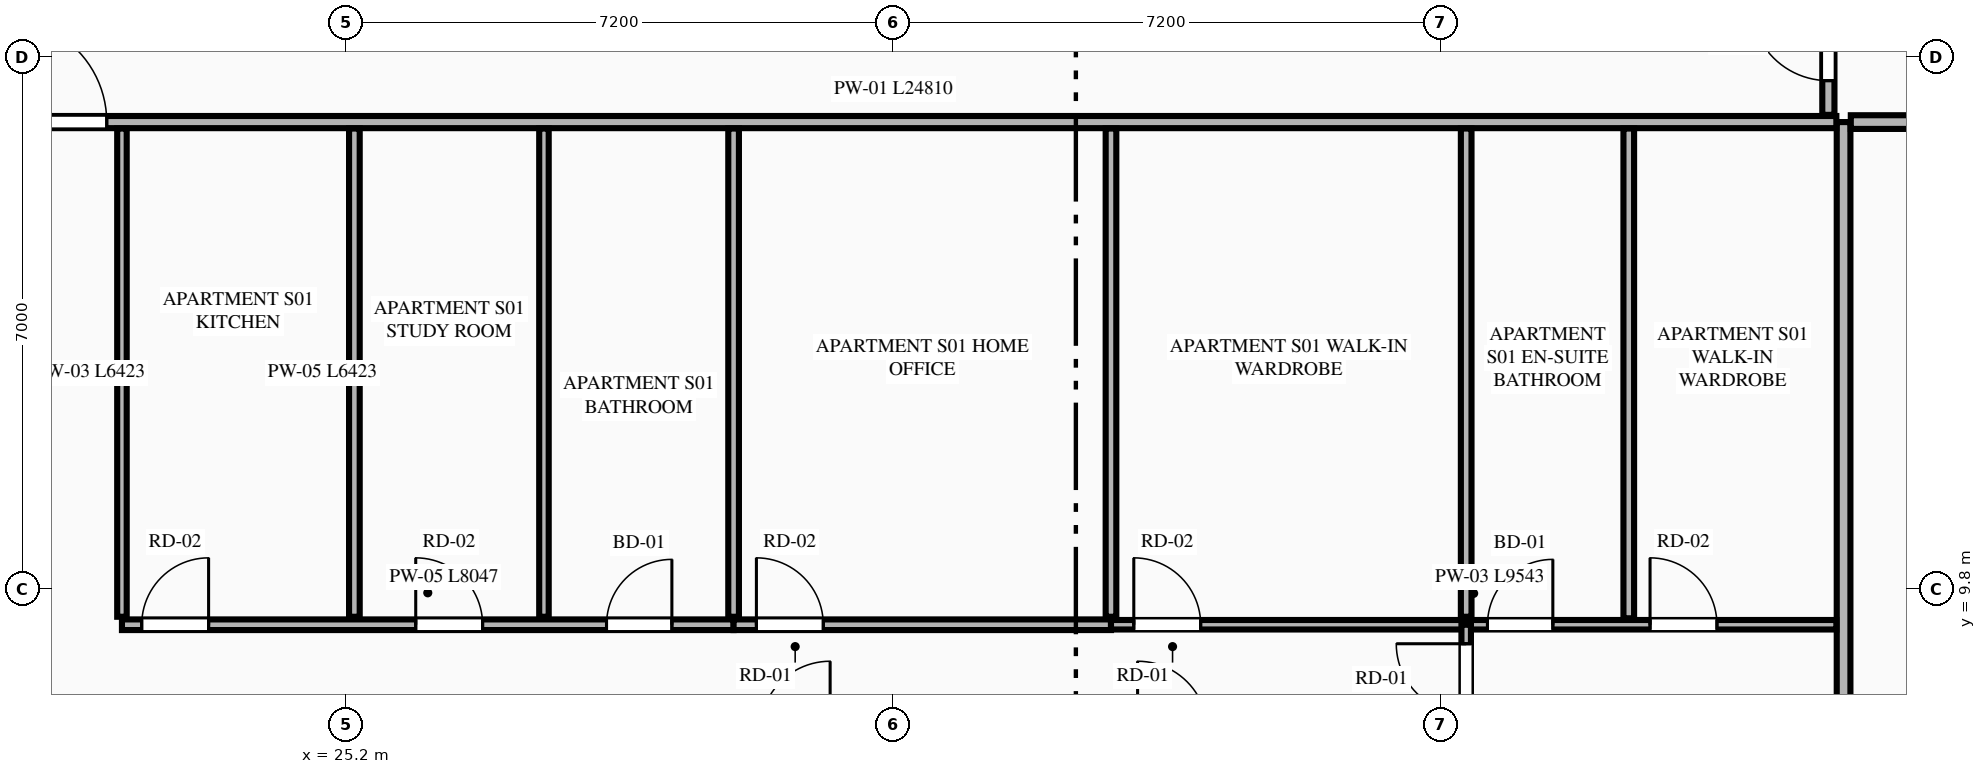
"""IFC4 building model, lengths in metres.
Left out: names, types, materials, properties, quantities, classifications, styles, units other than length and angle.
Written with IfcOpenShell. Run it as: python <this file> out.ifc"""

import sys

from ifc_helpers import new_model, si_unit, direction, frame, frame_2d, origin, place, context, subcontext, project, spatial, rectangle, extrude, element, fill, save


model = new_model("IFC4")
c1 = context("Model", 3, precision=1e-05, world=origin(), true_north=direction((0.0, 1.0)))
c2 = subcontext(c1, "Body", "Model", "MODEL_VIEW")
j1 = project(units=[si_unit("LENGTHUNIT", "METRE"), si_unit("PLANEANGLEUNIT", "RADIAN")], contexts=[c1])
p1 = place(None, origin())
s1 = spatial("IfcSite", under=j1, at=p1, CompositionType="ELEMENT")
p2 = place(p1, origin())
s2 = spatial("IfcBuilding", under=s1, at=p2, CompositionType="ELEMENT")
p3 = place(p2, frame((0.0, 0.0, 67.5)))
s3 = spatial("IfcBuildingStorey", under=s2, at=p3, CompositionType="ELEMENT", Elevation=67.5)
p4 = place(p3, frame((44.9, 2.455, 0.0), z_axis=(0.0, 0.0, 1.0), x_axis=(0.0, 1.0, 0.0)))
e1 = element("IfcWall", 1, at=p4, inside=s3, PredefinedType="PARTITIONING", context=c2, shape_type="SweptSolid", body=[
    extrude(rectangle(XDim=13.495, YDim=0.18, at=frame_2d((6.748, 0.0))), origin(), (0.0, 0.0, 1.0), 3.33),
])
p5 = place(p3, frame((19.995, 15.95, 0.0), z_axis=(0.0, 0.0, 1.0), x_axis=(1.0, 0.0, 0.0)))
e2 = element("IfcWall", 2, at=p5, inside=s3, PredefinedType="PARTITIONING", context=c2, shape_type="SweptSolid", body=[
    extrude(rectangle(XDim=24.81, YDim=0.16, at=frame_2d((12.405, 0.0))), origin(), (0.0, 0.0, 1.0), 3.33),
])
p6 = place(p5, frame((0.705, 0.0, 0.0)))
e3 = element("IfcOpeningElement", 3, at=p6, cuts=e2, PredefinedType="OPENING", context=c2, shape_type="SweptSolid", body=[
    extrude(rectangle(XDim=1.35, YDim=2.35, at=frame_2d((0.675, 1.175))), frame((0.0, 0.09, 0.0), z_axis=(0.0, -1.0, 0.0), x_axis=(1.0, 0.0, 0.0)), (0.0, 0.0, 1.0), 0.18),
])
p7 = place(p3, frame((22.25, 9.442, 0.0), z_axis=(0.0, 0.0, 1.0), x_axis=(0.0, 1.0, 0.0)))
e4 = element("IfcWall", 4, at=p7, inside=s3, PredefinedType="PARTITIONING", context=c2, shape_type="SweptSolid", body=[
    extrude(rectangle(XDim=6.423, YDim=0.125, at=frame_2d((3.211, 0.0))), origin(), (0.0, 0.0, 1.0), 2.636),
])
p8 = place(p3, frame((22.25, 9.337, 0.0), z_axis=(0.0, 0.0, 1.0), x_axis=(1.0, 0.0, 0.0)))
e5 = element("IfcWall", 5, at=p8, inside=s3, PredefinedType="PLUMBINGWALL", context=c2, shape_type="SweptSolid", body=[
    extrude(rectangle(XDim=8.047, YDim=0.14, at=frame_2d((4.023, 0.0))), origin(), (0.0, 0.0, 1.0), 3.33),
])
p9 = place(p8, frame((6.375, 0.0, 0.0)))
e6 = element("IfcOpeningElement", 6, at=p9, cuts=e5, PredefinedType="OPENING", context=c2, shape_type="SweptSolid", body=[
    extrude(rectangle(XDim=0.86, YDim=2.1, at=frame_2d((0.43, 1.05))), frame((0.0, 0.08, 0.0), z_axis=(0.0, -1.0, 0.0), x_axis=(1.0, 0.0, 0.0)), (0.0, 0.0, 1.0), 0.16),
])
p10 = place(p8, frame((0.26, 0.0, 0.0)))
e7 = element("IfcOpeningElement", 7, at=p10, cuts=e5, PredefinedType="OPENING", context=c2, shape_type="SweptSolid", body=[
    extrude(rectangle(XDim=0.88, YDim=2.15, at=frame_2d((0.44, 1.075))), frame((0.0, 0.08, 0.0), z_axis=(0.0, -1.0, 0.0), x_axis=(1.0, 0.0, 0.0)), (0.0, 0.0, 1.0), 0.16),
])
p11 = place(p8, frame((3.865, 0.0, 0.0)))
e8 = element("IfcOpeningElement", 8, at=p11, cuts=e5, PredefinedType="OPENING", context=c2, shape_type="SweptSolid", body=[
    extrude(rectangle(XDim=0.88, YDim=2.15, at=frame_2d((0.44, 1.075))), frame((0.0, 0.08, 0.0), z_axis=(0.0, -1.0, 0.0), x_axis=(1.0, 0.0, 0.0)), (0.0, 0.0, 1.0), 0.16),
])
p12 = place(p3, frame((30.297, 9.337, 0.0), z_axis=(0.0, 0.0, 1.0), x_axis=(1.0, 0.0, 0.0)))
e9 = element("IfcWall", 9, at=p12, inside=s3, PredefinedType="PLUMBINGWALL", context=c2, shape_type="SweptSolid", body=[
    extrude(rectangle(XDim=4.965, YDim=0.14, at=frame_2d((2.482, 0.0))), origin(), (0.0, 0.0, 1.0), 3.33),
])
p13 = place(p12, frame((0.3, 0.0, 0.0)))
e10 = element("IfcOpeningElement", 10, at=p13, cuts=e9, PredefinedType="OPENING", context=c2, shape_type="SweptSolid", body=[
    extrude(rectangle(XDim=0.88, YDim=2.15, at=frame_2d((0.44, 1.075))), frame((0.0, 0.08, 0.0), z_axis=(0.0, -1.0, 0.0), x_axis=(1.0, 0.0, 0.0)), (0.0, 0.0, 1.0), 0.16),
])
p14 = place(p3, frame((35.262, 9.337, 0.0), z_axis=(0.0, 0.0, 1.0), x_axis=(1.0, 0.0, 0.0)))
e11 = element("IfcWall", 11, at=p14, inside=s3, PredefinedType="PARTITIONING", context=c2, shape_type="SweptSolid", body=[
    extrude(rectangle(XDim=9.543, YDim=0.125, at=frame_2d((4.771, 0.0))), origin(), (0.0, 0.0, 1.0), 3.33),
])
p15 = place(p14, frame((4.953, 0.0, 0.0)))
e12 = element("IfcOpeningElement", 12, at=p15, cuts=e11, PredefinedType="OPENING", context=c2, shape_type="SweptSolid", body=[
    extrude(rectangle(XDim=0.86, YDim=2.1, at=frame_2d((0.43, 1.05))), frame((0.0, 0.073, 0.0), z_axis=(0.0, -1.0, 0.0), x_axis=(1.0, 0.0, 0.0)), (0.0, 0.0, 1.0), 0.145),
])
p16 = place(p14, frame((7.092, 0.0, 0.0)))
e13 = element("IfcOpeningElement", 13, at=p16, cuts=e11, PredefinedType="OPENING", context=c2, shape_type="SweptSolid", body=[
    extrude(rectangle(XDim=0.88, YDim=2.15, at=frame_2d((0.44, 1.075))), frame((0.0, 0.073, 0.0), z_axis=(0.0, -1.0, 0.0), x_axis=(1.0, 0.0, 0.0)), (0.0, 0.0, 1.0), 0.145),
])
p17 = place(p14, frame((0.3, 0.0, 0.0)))
e14 = element("IfcOpeningElement", 14, at=p17, cuts=e11, PredefinedType="OPENING", context=c2, shape_type="SweptSolid", body=[
    extrude(rectangle(XDim=0.88, YDim=2.15, at=frame_2d((0.44, 1.075))), frame((0.0, 0.073, 0.0), z_axis=(0.0, -1.0, 0.0), x_axis=(1.0, 0.0, 0.0)), (0.0, 0.0, 1.0), 0.145),
])
p18 = place(p3, frame((25.308, 9.442, 0.0), z_axis=(0.0, 0.0, 1.0), x_axis=(0.0, 1.0, 0.0)))
e15 = element("IfcWall", 15, at=p18, inside=s3, PredefinedType="PLUMBINGWALL", context=c2, shape_type="SweptSolid", body=[
    extrude(rectangle(XDim=6.423, YDim=0.14, at=frame_2d((3.211, 0.0))), origin(), (0.0, 0.0, 1.0), 3.33),
])
p19 = place(p3, frame((27.802, 9.442, 0.0), z_axis=(0.0, 0.0, 1.0), x_axis=(0.0, 1.0, 0.0)))
e16 = element("IfcWall", 16, at=p19, inside=s3, PredefinedType="PARTITIONING", context=c2, shape_type="SweptSolid", body=[
    extrude(rectangle(XDim=6.423, YDim=0.125, at=frame_2d((3.211, 0.0))), origin(), (0.0, 0.0, 1.0), 3.33),
])
p20 = place(p3, frame((39.935, 8.007, 0.0), z_axis=(0.0, 0.0, 1.0), x_axis=(0.0, 1.0, 0.0)))
e17 = element("IfcWall", 17, at=p20, inside=s3, PredefinedType="PARTITIONING", context=c2, shape_type="SweptSolid", body=[
    extrude(rectangle(XDim=1.33, YDim=0.125, at=frame_2d((0.665, 0.0))), origin(), (0.0, 0.0, 1.0), 3.33),
])
p21 = place(p20, frame((0.16, 0.0, 0.0)))
e18 = element("IfcOpeningElement", 18, at=p21, cuts=e17, PredefinedType="OPENING", context=c2, shape_type="SweptSolid", body=[
    extrude(rectangle(XDim=0.92, YDim=2.15, at=frame_2d((0.46, 1.075))), frame((0.0, 0.073, 0.0), z_axis=(0.0, -1.0, 0.0), x_axis=(1.0, 0.0, 0.0)), (0.0, 0.0, 1.0), 0.145),
])
for number, where, z_axis, x_axis in (
    (19, (30.297, 9.442, 0.0), (0.0, 0.0, 1.0), (0.0, 1.0, 0.0)),
    (20, (35.262, 9.442, 0.0), (0.0, 0.0, 1.0), (0.0, 1.0, 0.0)),
    (21, (39.935, 9.442, 0.0), (0.0, 0.0, 1.0), (0.0, 1.0, 0.0)),
):
    element("IfcWall", number, at=place(p3, frame(where, z_axis=z_axis, x_axis=x_axis)), inside=s3, PredefinedType="PLUMBINGWALL", context=c2, shape_type="SweptSolid", body=[
        extrude(rectangle(XDim=6.423, YDim=0.14, at=frame_2d((3.211, 0.0))), origin(), (0.0, 0.0, 1.0), 3.33),
    ])
p22 = place(p3, frame((42.074, 9.422, 0.0), z_axis=(0.0, 0.0, 1.0), x_axis=(0.0, 1.0, 0.0)))
e22 = element("IfcWall", 22, at=p22, inside=s3, PredefinedType="PLUMBINGWALL", context=c2, shape_type="SweptSolid", body=[
    extrude(rectangle(XDim=6.443, YDim=0.14, at=frame_2d((3.221, 0.0))), origin(), (0.0, 0.0, 1.0), 2.636),
])
p23 = place(p3, frame((44.995, 15.95, 0.0), z_axis=(0.0, 0.0, 1.0), x_axis=(1.0, 0.0, 0.0)))
e23 = element("IfcWall", 23, at=p23, inside=s3, PredefinedType="PARTITIONING", context=c2, shape_type="SweptSolid", body=[
    extrude(rectangle(XDim=9.241, YDim=0.18, at=frame_2d((4.621, 0.0))), origin(), (0.0, 0.0, 1.0), 3.33),
])
p24 = place(p3, frame((44.7, 16.045, 0.0), z_axis=(0.0, 0.0, 1.0), x_axis=(0.0, 1.0, 0.0)))
e24 = element("IfcWall", 24, at=p24, inside=s3, PredefinedType="PARTITIONING", context=c2, shape_type="SweptSolid", body=[
    extrude(rectangle(XDim=8.765, YDim=0.16, at=frame_2d((4.383, 0.0))), origin(), (0.0, 0.0, 1.0), 3.33),
])
p25 = place(p24, frame((0.45, 0.0, 0.0)))
e25 = element("IfcOpeningElement", 25, at=p25, cuts=e24, PredefinedType="OPENING", context=c2, shape_type="SweptSolid", body=[
    extrude(rectangle(XDim=1.02, YDim=2.25, at=frame_2d((0.51, 1.125))), frame((0.0, 0.09, 0.0), z_axis=(0.0, -1.0, 0.0), x_axis=(1.0, 0.0, 0.0)), (0.0, 0.0, 1.0), 0.18),
])
p26 = place(p9, origin())
e26 = element("IfcDoor", 26, at=p26, inside=s3, OperationType="SINGLE_SWING_RIGHT", PredefinedType="DOOR", context=c2, shape_type="SweptSolid", body=[
    extrude(rectangle(XDim=0.86, YDim=2.1, at=frame_2d((0.43, 1.05))), frame((0.0, 0.025, 0.0), z_axis=(0.0, -1.0, 0.0), x_axis=(1.0, 0.0, 0.0)), (0.0, 0.0, 1.0), 0.05),
])
fill(e6, e26)
p27 = place(p15, origin())
e27 = element("IfcDoor", 27, at=p27, inside=s3, OperationType="SINGLE_SWING_RIGHT", PredefinedType="DOOR", context=c2, shape_type="SweptSolid", body=[
    extrude(rectangle(XDim=0.86, YDim=2.1, at=frame_2d((0.43, 1.05))), frame((0.0, 0.025, 0.0), z_axis=(0.0, -1.0, 0.0), x_axis=(1.0, 0.0, 0.0)), (0.0, 0.0, 1.0), 0.05),
])
fill(e12, e27)
p28 = place(p16, origin())
e28 = element("IfcDoor", 28, at=p28, inside=s3, OperationType="SINGLE_SWING_LEFT", PredefinedType="DOOR", context=c2, shape_type="SweptSolid", body=[
    extrude(rectangle(XDim=0.88, YDim=2.15, at=frame_2d((0.44, 1.075))), frame((0.0, 0.025, 0.0), z_axis=(0.0, -1.0, 0.0), x_axis=(1.0, 0.0, 0.0)), (0.0, 0.0, 1.0), 0.05),
])
fill(e13, e28)
p29 = place(p6, origin())
e29 = element("IfcDoor", 29, at=p29, inside=s3, OperationType="SINGLE_SWING_LEFT", PredefinedType="DOOR", context=c2, shape_type="SweptSolid", body=[
    extrude(rectangle(XDim=1.35, YDim=2.35, at=frame_2d((0.675, 1.175))), frame((0.0, 0.025, 0.0), z_axis=(0.0, -1.0, 0.0), x_axis=(1.0, 0.0, 0.0)), (0.0, 0.0, 1.0), 0.05),
])
fill(e3, e29)
p30 = place(p10, origin())
e30 = element("IfcDoor", 30, at=p30, inside=s3, OperationType="SINGLE_SWING_RIGHT", PredefinedType="DOOR", context=c2, shape_type="SweptSolid", body=[
    extrude(rectangle(XDim=0.88, YDim=2.15, at=frame_2d((0.44, 1.075))), frame((0.0, 0.025, 0.0), z_axis=(0.0, -1.0, 0.0), x_axis=(1.0, 0.0, 0.0)), (0.0, 0.0, 1.0), 0.05),
])
fill(e7, e30)
p31 = place(p11, origin())
e31 = element("IfcDoor", 31, at=p31, inside=s3, OperationType="SINGLE_SWING_LEFT", PredefinedType="DOOR", context=c2, shape_type="SweptSolid", body=[
    extrude(rectangle(XDim=0.88, YDim=2.15, at=frame_2d((0.44, 1.075))), frame((0.0, 0.025, 0.0), z_axis=(0.0, -1.0, 0.0), x_axis=(1.0, 0.0, 0.0)), (0.0, 0.0, 1.0), 0.05),
])
fill(e8, e31)
p32 = place(p13, origin())
e32 = element("IfcDoor", 32, at=p32, inside=s3, OperationType="SINGLE_SWING_LEFT", PredefinedType="DOOR", context=c2, shape_type="SweptSolid", body=[
    extrude(rectangle(XDim=0.88, YDim=2.15, at=frame_2d((0.44, 1.075))), frame((0.0, 0.025, 0.0), z_axis=(0.0, -1.0, 0.0), x_axis=(1.0, 0.0, 0.0)), (0.0, 0.0, 1.0), 0.05),
])
fill(e10, e32)
p33 = place(p21, origin())
e33 = element("IfcDoor", 33, at=p33, inside=s3, OperationType="SINGLE_SWING_RIGHT", PredefinedType="DOOR", context=c2, shape_type="SweptSolid", body=[
    extrude(rectangle(XDim=0.92, YDim=2.15, at=frame_2d((0.46, 1.075))), frame((0.0, 0.025, 0.0), z_axis=(0.0, -1.0, 0.0), x_axis=(1.0, 0.0, 0.0)), (0.0, 0.0, 1.0), 0.05),
])
fill(e18, e33)
p34 = place(p17, origin())
e34 = element("IfcDoor", 34, at=p34, inside=s3, OperationType="SINGLE_SWING_LEFT", PredefinedType="DOOR", context=c2, shape_type="SweptSolid", body=[
    extrude(rectangle(XDim=0.88, YDim=2.15, at=frame_2d((0.44, 1.075))), frame((0.0, 0.025, 0.0), z_axis=(0.0, -1.0, 0.0), x_axis=(1.0, 0.0, 0.0)), (0.0, 0.0, 1.0), 0.05),
])
fill(e14, e34)
p35 = place(p25, origin())
e35 = element("IfcDoor", 35, at=p35, inside=s3, OperationType="SINGLE_SWING_RIGHT", PredefinedType="DOOR", context=c2, shape_type="SweptSolid", body=[
    extrude(rectangle(XDim=1.02, YDim=2.25, at=frame_2d((0.51, 1.125))), frame((0.0, 0.025, 0.0), z_axis=(0.0, -1.0, 0.0), x_axis=(1.0, 0.0, 0.0)), (0.0, 0.0, 1.0), 0.05),
])
fill(e25, e35)
save(model, sys.argv[1])
